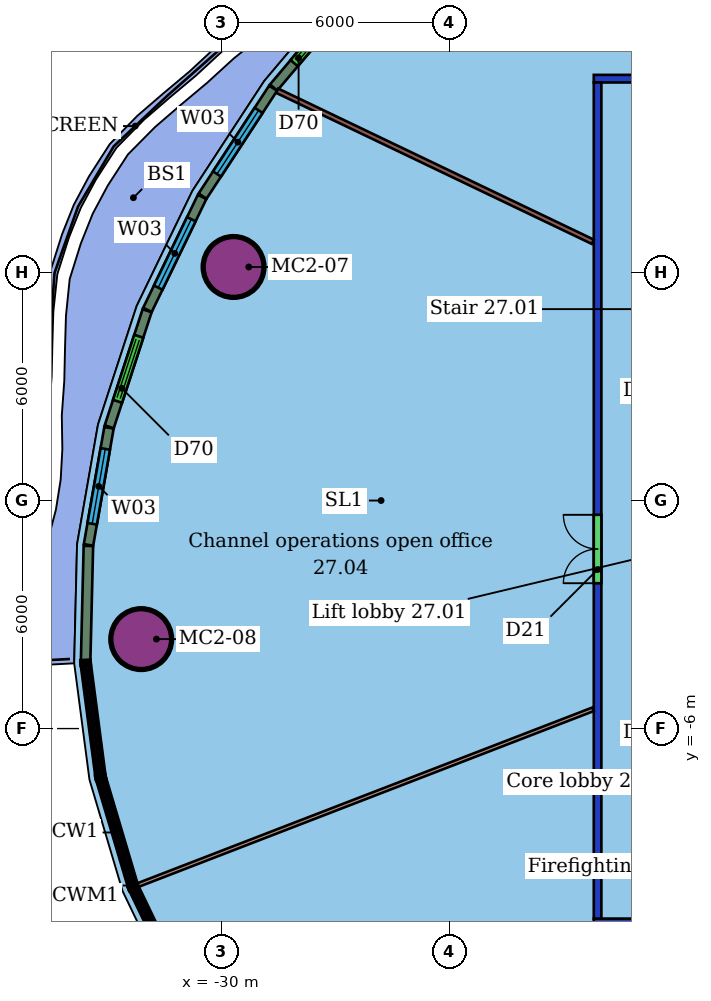
"""IFC4 building model, lengths in metres.
Left out: names, types, materials, properties, quantities, classifications, styles, units other than length and angle.
Written with IfcOpenShell. Run it as: python <this file> out.ifc"""

import sys

from ifc_helpers import new_model, si_unit, direction, frame, frame_2d, origin, origin_2d, place, context, subcontext, project, spatial, rectangle, hollow_circle, extrude, element, fill, save


model = new_model("IFC4")
c1 = context("Model", 3, precision=1e-05, world=origin(), true_north=direction((0.0, 1.0)))
c2 = subcontext(c1, "Body", "Model", "MODEL_VIEW")
j1 = project(units=[si_unit("LENGTHUNIT", "METRE"), si_unit("PLANEANGLEUNIT", "RADIAN")], contexts=[c1])
p1 = place(None, origin())
s1 = spatial("IfcSite", under=j1, at=p1, CompositionType="ELEMENT")
p2 = place(p1, origin())
s2 = spatial("IfcBuilding", under=s1, at=p2, CompositionType="ELEMENT")
p3 = place(p2, frame((0.0, 0.0, 117.4)))
s3 = spatial("IfcBuildingStorey", under=s2, at=p3, CompositionType="ELEMENT", Elevation=117.4)
for number, where, z_axis, x_axis in (
    (1, (-29.679, 6.146, 0.0), (0.0, 0.0, 1.0), (1.0, 0.0, 0.0)),
    (2, (-32.109, -3.646, 0.0), (0.0, 0.0, 1.0), (1.0, 0.0, 0.0)),
):
    element("IfcColumn", number, at=place(p3, frame(where, z_axis=z_axis, x_axis=x_axis)), inside=s3, PredefinedType="COLUMN", context=c2, shape_type="SweptSolid", body=[
        extrude(hollow_circle(Radius=0.8, WallThickness=0.055, at=origin_2d()), origin(), (0.0, 0.0, 1.0), 3.45),
    ])
p4 = place(p3, frame((8.2, -11.1, 0.0), z_axis=(0.0, 0.0, 1.0), x_axis=(-1.0, 0.0, 0.0)))
e3 = element("IfcWall", 3, at=p4, inside=s3, PredefinedType="PARTITIONING", context=c2, shape_type="SweptSolid", body=[
    extrude(rectangle(XDim=28.4, YDim=0.2, at=frame_2d((14.2, 0.0))), origin(), (0.0, 0.0, 1.0), 3.0),
])
p5 = place(p4, frame((18.882, 0.0, 0.0)))
e4 = element("IfcOpeningElement", 4, at=p5, cuts=e3, PredefinedType="OPENING", context=c2, shape_type="SweptSolid", body=[
    extrude(rectangle(XDim=1.8, YDim=2.1, at=frame_2d((0.9, 1.05))), frame((0.0, 0.11, 0.0), z_axis=(0.0, -1.0, 0.0), x_axis=(1.0, 0.0, 0.0)), (0.0, 0.0, 1.0), 0.22),
])
p6 = place(p4, frame((9.322, 0.0, 0.0)))
e5 = element("IfcOpeningElement", 5, at=p6, cuts=e3, PredefinedType="OPENING", context=c2, shape_type="SweptSolid", body=[
    extrude(rectangle(XDim=1.8, YDim=2.1, at=frame_2d((0.9, 1.05))), frame((0.0, 0.11, 0.0), z_axis=(0.0, -1.0, 0.0), x_axis=(1.0, 0.0, 0.0)), (0.0, 0.0, 1.0), 0.22),
])
p7 = place(p3, frame((-20.1, -11.0, 0.0), z_axis=(0.0, 0.0, 1.0), x_axis=(0.0, 1.0, 0.0)))
e6 = element("IfcWall", 6, at=p7, inside=s3, PredefinedType="PARTITIONING", context=c2, shape_type="SweptSolid", body=[
    extrude(rectangle(XDim=22.0, YDim=0.2, at=frame_2d((11.0, 0.0))), origin(), (0.0, 0.0, 1.0), 3.0),
])
p8 = place(p7, frame((8.824, 0.0, 0.0)))
e7 = element("IfcOpeningElement", 7, at=p8, cuts=e6, PredefinedType="OPENING", context=c2, shape_type="SweptSolid", body=[
    extrude(rectangle(XDim=1.8, YDim=2.1, at=frame_2d((0.9, 1.05))), frame((0.0, 0.11, 0.0), z_axis=(0.0, -1.0, 0.0), x_axis=(1.0, 0.0, 0.0)), (0.0, 0.0, 1.0), 0.22),
])
p9 = place(p3, frame((-20.2, 11.1, 0.0), z_axis=(0.0, 0.0, 1.0), x_axis=(1.0, 0.0, 0.0)))
e8 = element("IfcWall", 8, at=p9, inside=s3, PredefinedType="PARTITIONING", context=c2, shape_type="SweptSolid", body=[
    extrude(rectangle(XDim=28.4, YDim=0.2, at=frame_2d((14.2, 0.0))), origin(), (0.0, 0.0, 1.0), 3.0),
])
p10 = place(p9, frame((20.105, 0.0, 0.0)))
e9 = element("IfcOpeningElement", 9, at=p10, cuts=e8, PredefinedType="OPENING", context=c2, shape_type="SweptSolid", body=[
    extrude(rectangle(XDim=1.8, YDim=2.1, at=frame_2d((0.9, 1.05))), frame((0.0, 0.11, 0.0), z_axis=(0.0, -1.0, 0.0), x_axis=(1.0, 0.0, 0.0)), (0.0, 0.0, 1.0), 0.22),
])
p11 = place(p9, frame((7.47, 0.0, 0.0)))
e10 = element("IfcOpeningElement", 10, at=p11, cuts=e8, PredefinedType="OPENING", context=c2, shape_type="SweptSolid", body=[
    extrude(rectangle(XDim=1.0, YDim=2.1, at=frame_2d((0.5, 1.05))), frame((0.0, 0.11, 0.0), z_axis=(0.0, -1.0, 0.0), x_axis=(1.0, 0.0, 0.0)), (0.0, 0.0, 1.0), 0.22),
])
p12 = place(p9, frame((2.651, 0.0, 0.0)))
e11 = element("IfcOpeningElement", 11, at=p12, cuts=e8, PredefinedType="OPENING", context=c2, shape_type="SweptSolid", body=[
    extrude(rectangle(XDim=1.0, YDim=2.4, at=frame_2d((0.5, 1.2))), frame((0.0, 0.11, 0.0), z_axis=(0.0, -1.0, 0.0), x_axis=(1.0, 0.0, 0.0)), (0.0, 0.0, 1.0), 0.22),
])
p13 = place(p3, frame((-20.782, 18.041, 0.0), z_axis=(0.0, 0.0, 1.0), x_axis=(0.633801615076, -0.773495644931, 0.0)))
e12 = element("IfcWall", 12, at=p13, inside=s3, PredefinedType="PARTITIONING", context=c2, shape_type="SweptSolid", body=[
    extrude(rectangle(XDim=8.792, YDim=0.125, at=frame_2d((4.396, 0.0))), origin(), (0.0, 0.0, 1.0), 3.45),
])
p14 = place(p3, frame((-28.532, 10.784, 0.0), z_axis=(0.0, 0.0, 1.0), x_axis=(0.902015716064, -0.431703194306, 0.0)))
e13 = element("IfcWall", 13, at=p14, inside=s3, PredefinedType="PARTITIONING", context=c2, shape_type="SweptSolid", body=[
    extrude(rectangle(XDim=9.207, YDim=0.125, at=frame_2d((4.604, 0.0))), origin(), (0.0, 0.0, 1.0), 3.45),
])
p15 = place(p3, frame((-32.203, -10.122, 0.0), z_axis=(0.0, 0.0, 1.0), x_axis=(0.932826006306, 0.360327131866, 0.0)))
e14 = element("IfcWall", 14, at=p15, inside=s3, PredefinedType="PARTITIONING", context=c2, shape_type="SweptSolid", body=[
    extrude(rectangle(XDim=12.848, YDim=0.1, at=frame_2d((6.424, 0.0))), origin(), (0.0, 0.0, 1.0), 3.45),
])
p16 = place(p3, frame((-26.381, 13.524, 0.0), z_axis=(0.0, 0.0, 1.0), x_axis=(-0.645164421971, -0.764043760934, 0.0)))
e15 = element("IfcWall", 15, at=p16, inside=s3, PredefinedType="SOLIDWALL", context=c2, shape_type="SweptSolid", body=[
    extrude(rectangle(XDim=3.477, YDim=0.25, at=frame_2d((1.738, 0.0))), origin(), (0.0, 0.0, 1.0), 3.05),
])
p17 = place(p16, frame((0.839, 0.0, 0.0)))
e16 = element("IfcOpeningElement", 16, at=p17, cuts=e15, PredefinedType="OPENING", context=c2, shape_type="SweptSolid", body=[
    extrude(rectangle(XDim=1.8, YDim=2.4, at=frame_2d((0.9, 1.2))), frame((0.0, 0.135, 0.0), z_axis=(0.0, -1.0, 0.0), x_axis=(1.0, 0.0, 0.0)), (0.0, 0.0, 1.0), 0.27),
])
p18 = place(p3, frame((-28.638, 10.849, 0.0), z_axis=(0.0, 0.0, 1.0), x_axis=(-0.547270693195, -0.836955666908, 0.0)))
e17 = element("IfcWall", 17, at=p18, inside=s3, PredefinedType="SOLIDWALL", context=c2, shape_type="SweptSolid", body=[
    extrude(rectangle(XDim=3.392, YDim=0.25, at=frame_2d((1.696, 0.0))), origin(), (0.0, 0.0, 1.0), 3.05),
])
p19 = place(p18, frame((0.696, 0.0, 0.9)))
e18 = element("IfcOpeningElement", 18, at=p19, cuts=e17, PredefinedType="OPENING", context=c2, shape_type="SweptSolid", body=[
    extrude(rectangle(XDim=2.0, YDim=2.1, at=frame_2d((1.0, 1.05))), frame((0.0, 0.135, 0.0), z_axis=(0.0, -1.0, 0.0), x_axis=(1.0, 0.0, 0.0)), (0.0, 0.0, 1.0), 0.27),
])
p20 = place(p3, frame((-30.507, 7.989, 0.0), z_axis=(0.0, 0.0, 1.0), x_axis=(-0.435582187372, -0.900148964363, 0.0)))
e19 = element("IfcWall", 19, at=p20, inside=s3, PredefinedType="SOLIDWALL", context=c2, shape_type="SweptSolid", body=[
    extrude(rectangle(XDim=3.302, YDim=0.25, at=frame_2d((1.651, 0.0))), origin(), (0.0, 0.0, 1.0), 3.05),
])
p21 = place(p20, frame((0.651, 0.0, 0.9)))
e20 = element("IfcOpeningElement", 20, at=p21, cuts=e19, PredefinedType="OPENING", context=c2, shape_type="SweptSolid", body=[
    extrude(rectangle(XDim=2.0, YDim=2.1, at=frame_2d((1.0, 1.05))), frame((0.0, 0.135, 0.0), z_axis=(0.0, -1.0, 0.0), x_axis=(1.0, 0.0, 0.0)), (0.0, 0.0, 1.0), 0.27),
])
p22 = place(p3, frame((-31.954, 4.993, 0.0), z_axis=(0.0, 0.0, 1.0), x_axis=(-0.310270013997, -0.950648472578, 0.0)))
e21 = element("IfcWall", 21, at=p22, inside=s3, PredefinedType="SOLIDWALL", context=c2, shape_type="SweptSolid", body=[
    extrude(rectangle(XDim=3.212, YDim=0.25, at=frame_2d((1.606, 0.0))), origin(), (0.0, 0.0, 1.0), 3.05),
])
p23 = place(p22, frame((0.706, 0.0, 0.0)))
e22 = element("IfcOpeningElement", 22, at=p23, cuts=e21, PredefinedType="OPENING", context=c2, shape_type="SweptSolid", body=[
    extrude(rectangle(XDim=1.8, YDim=2.4, at=frame_2d((0.9, 1.2))), frame((0.0, 0.135, 0.0), z_axis=(0.0, -1.0, 0.0), x_axis=(1.0, 0.0, 0.0)), (0.0, 0.0, 1.0), 0.27),
])
p24 = place(p3, frame((-32.957, 1.915, 0.0), z_axis=(0.0, 0.0, 1.0), x_axis=(-0.172262996508, -0.985050993621, 0.0)))
e23 = element("IfcWall", 23, at=p24, inside=s3, PredefinedType="SOLIDWALL", context=c2, shape_type="SweptSolid", body=[
    extrude(rectangle(XDim=3.129, YDim=0.25, at=frame_2d((1.565, 0.0))), origin(), (0.0, 0.0, 1.0), 3.05),
])
p25 = place(p24, frame((0.565, 0.0, 0.9)))
e24 = element("IfcOpeningElement", 24, at=p25, cuts=e23, PredefinedType="OPENING", context=c2, shape_type="SweptSolid", body=[
    extrude(rectangle(XDim=2.0, YDim=2.1, at=frame_2d((1.0, 1.05))), frame((0.0, 0.135, 0.0), z_axis=(0.0, -1.0, 0.0), x_axis=(1.0, 0.0, 0.0)), (0.0, 0.0, 1.0), 0.27),
])
p26 = place(p3, frame((-33.499, -1.194, 0.0), z_axis=(0.0, 0.0, 1.0), x_axis=(-0.024099130641, -0.999709573777, 0.0)))
e25 = element("IfcWall", 25, at=p26, inside=s3, PredefinedType="SOLIDWALL", context=c2, shape_type="SweptSolid", body=[
    extrude(rectangle(XDim=3.019, YDim=0.25, at=frame_2d((1.51, 0.0))), origin(), (0.0, 0.0, 1.0), 3.05),
])
p27 = place(p8, origin())
e26 = element("IfcDoor", 26, at=p27, inside=s3, OperationType="DOUBLE_DOOR_SINGLE_SWING", PredefinedType="DOOR", context=c2, shape_type="SweptSolid", body=[
    extrude(rectangle(XDim=1.8, YDim=2.1, at=frame_2d((0.9, 1.05))), frame((0.0, 0.025, 0.0), z_axis=(0.0, -1.0, 0.0), x_axis=(1.0, 0.0, 0.0)), (0.0, 0.0, 1.0), 0.05),
])
fill(e7, e26)
p28 = place(p17, origin())
e27 = element("IfcDoor", 27, at=p28, inside=s3, OperationType="DOUBLE_DOOR_SLIDING", PredefinedType="DOOR", context=c2, shape_type="SweptSolid", body=[
    extrude(rectangle(XDim=1.8, YDim=2.4, at=frame_2d((0.9, 1.2))), frame((0.0, 0.025, 0.0), z_axis=(0.0, -1.0, 0.0), x_axis=(1.0, 0.0, 0.0)), (0.0, 0.0, 1.0), 0.05),
])
fill(e16, e27)
p29 = place(p19, origin())
e28 = element("IfcWindow", 28, at=p29, inside=s3, PartitioningType="SINGLE_PANEL", PredefinedType="WINDOW", context=c2, shape_type="SweptSolid", body=[
    extrude(rectangle(XDim=2.0, YDim=2.1, at=frame_2d((1.0, 1.05))), frame((0.0, 0.03, 0.0), z_axis=(0.0, -1.0, 0.0), x_axis=(1.0, 0.0, 0.0)), (0.0, 0.0, 1.0), 0.06),
])
fill(e18, e28)
p30 = place(p21, origin())
e29 = element("IfcWindow", 29, at=p30, inside=s3, PartitioningType="SINGLE_PANEL", PredefinedType="WINDOW", context=c2, shape_type="SweptSolid", body=[
    extrude(rectangle(XDim=2.0, YDim=2.1, at=frame_2d((1.0, 1.05))), frame((0.0, 0.03, 0.0), z_axis=(0.0, -1.0, 0.0), x_axis=(1.0, 0.0, 0.0)), (0.0, 0.0, 1.0), 0.06),
])
fill(e20, e29)
p31 = place(p23, origin())
e30 = element("IfcDoor", 30, at=p31, inside=s3, OperationType="DOUBLE_DOOR_SLIDING", PredefinedType="DOOR", context=c2, shape_type="SweptSolid", body=[
    extrude(rectangle(XDim=1.8, YDim=2.4, at=frame_2d((0.9, 1.2))), frame((0.0, 0.025, 0.0), z_axis=(0.0, -1.0, 0.0), x_axis=(1.0, 0.0, 0.0)), (0.0, 0.0, 1.0), 0.05),
])
fill(e22, e30)
p32 = place(p25, origin())
e31 = element("IfcWindow", 31, at=p32, inside=s3, PartitioningType="SINGLE_PANEL", PredefinedType="WINDOW", context=c2, shape_type="SweptSolid", body=[
    extrude(rectangle(XDim=2.0, YDim=2.1, at=frame_2d((1.0, 1.05))), frame((0.0, 0.03, 0.0), z_axis=(0.0, -1.0, 0.0), x_axis=(1.0, 0.0, 0.0)), (0.0, 0.0, 1.0), 0.06),
])
fill(e24, e31)
save(model, sys.argv[1])
